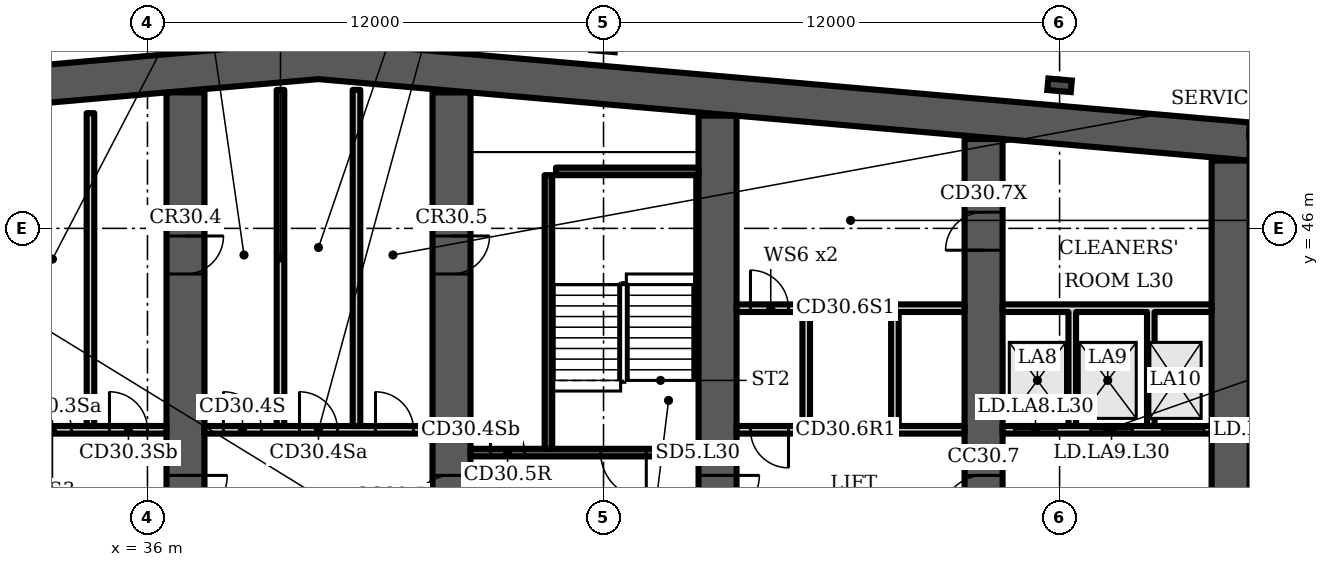
"""IFC4 building model, lengths in metres.
Left out: names, types, materials, properties, quantities, classifications, styles, units other than length and angle.
Written with IfcOpenShell. Run it as: python <this file> out.ifc"""

import sys

from ifc_helpers import new_model, si_unit, direction, frame, frame_2d, origin, origin_2d, place, context, subcontext, project, spatial, polyline, rectangle, i_section, outline, extrude, element, fill, save


model = new_model("IFC4")
c1 = context("Model", 3, precision=1e-05, world=origin(), true_north=direction((0.0, 1.0)))
c2 = subcontext(c1, "Body", "Model", "MODEL_VIEW")
j1 = project(units=[si_unit("LENGTHUNIT", "METRE"), si_unit("PLANEANGLEUNIT", "RADIAN")], contexts=[c1])
p1 = place(None, origin())
s1 = spatial("IfcSite", under=j1, at=p1, CompositionType="ELEMENT")
p2 = place(p1, origin())
s2 = spatial("IfcBuilding", under=s1, at=p2, CompositionType="ELEMENT")
p3 = place(p2, frame((0.0, 0.0, 129.1)))
s3 = spatial("IfcBuildingStorey", under=s2, at=p3, CompositionType="ELEMENT", Elevation=129.1)
p4 = place(p3, frame((0.0, 0.0, -0.0)))
e1 = element("IfcWall", 1, at=p4, inside=s3, PredefinedType="SHEAR", context=c2, shape_type="SweptSolid", body=[
    extrude(outline(polyline([(16.0, 47.784), (40.5, 49.927), (65.0, 47.784), (65.0, 48.787), (40.5, 50.931), (16.0, 48.787), (16.0, 47.784)])), origin(), (0.0, 0.0, 1.0), 3.6),
])
p5 = place(p3, frame((37.0, 35.0, 0.0), z_axis=(0.0, 0.0, 1.0), x_axis=(0.0, 1.0, 0.0)))
e2 = element("IfcWall", 2, at=p5, inside=s3, PredefinedType="SHEAR", context=c2, shape_type="SweptSolid", body=[
    extrude(rectangle(XDim=14.577, YDim=1.0, at=frame_2d((7.289, 0.0))), origin(), (0.0, 0.0, 1.0), 3.6),
])
p6 = place(p5, frame((3.4, 0.0, 0.0)))
e3 = element("IfcOpeningElement", 3, at=p6, cuts=e2, PredefinedType="OPENING", context=c2, shape_type="SweptSolid", body=[
    extrude(rectangle(XDim=1.1, YDim=2.1, at=frame_2d((0.55, 1.05))), frame((0.0, 0.51, 0.0), z_axis=(0.0, -1.0, 0.0), x_axis=(1.0, 0.0, 0.0)), (0.0, 0.0, 1.0), 1.02),
])
p7 = place(p5, frame((9.8, 0.0, 0.0)))
e4 = element("IfcOpeningElement", 4, at=p7, cuts=e2, PredefinedType="OPENING", context=c2, shape_type="SweptSolid", body=[
    extrude(rectangle(XDim=1.0, YDim=2.1, at=frame_2d((0.5, 1.05))), frame((0.0, 0.51, 0.0), z_axis=(0.0, -1.0, 0.0), x_axis=(1.0, 0.0, 0.0)), (0.0, 0.0, 1.0), 1.02),
])
p8 = place(p3, frame((44.0, 35.0, 0.0), z_axis=(0.0, 0.0, 1.0), x_axis=(0.0, 1.0, 0.0)))
e5 = element("IfcWall", 5, at=p8, inside=s3, PredefinedType="SHEAR", context=c2, shape_type="SweptSolid", body=[
    extrude(rectangle(XDim=14.577, YDim=1.0, at=frame_2d((7.289, 0.0))), origin(), (0.0, 0.0, 1.0), 3.6),
])
p9 = place(p8, frame((3.4, 0.0, 0.0)))
e6 = element("IfcOpeningElement", 6, at=p9, cuts=e5, PredefinedType="OPENING", context=c2, shape_type="SweptSolid", body=[
    extrude(rectangle(XDim=1.1, YDim=2.1, at=frame_2d((0.55, 1.05))), frame((0.0, 0.51, 0.0), z_axis=(0.0, -1.0, 0.0), x_axis=(1.0, 0.0, 0.0)), (0.0, 0.0, 1.0), 1.02),
])
p10 = place(p8, frame((9.8, 0.0, 0.0)))
e7 = element("IfcOpeningElement", 7, at=p10, cuts=e5, PredefinedType="OPENING", context=c2, shape_type="SweptSolid", body=[
    extrude(rectangle(XDim=1.0, YDim=2.1, at=frame_2d((0.5, 1.05))), frame((0.0, 0.51, 0.0), z_axis=(0.0, -1.0, 0.0), x_axis=(1.0, 0.0, 0.0)), (0.0, 0.0, 1.0), 1.02),
])
p11 = place(p3, frame((51.0, 35.0, 0.0), z_axis=(0.0, 0.0, 1.0), x_axis=(0.0, 1.0, 0.0)))
e8 = element("IfcWall", 8, at=p11, inside=s3, PredefinedType="SHEAR", context=c2, shape_type="SweptSolid", body=[
    extrude(rectangle(XDim=13.965, YDim=1.0, at=frame_2d((6.982, 0.0))), origin(), (0.0, 0.0, 1.0), 3.6),
])
p12 = place(p11, frame((3.4, 0.0, 0.0)))
e9 = element("IfcOpeningElement", 9, at=p12, cuts=e8, PredefinedType="OPENING", context=c2, shape_type="SweptSolid", body=[
    extrude(rectangle(XDim=1.1, YDim=2.1, at=frame_2d((0.55, 1.05))), frame((0.0, 0.51, 0.0), z_axis=(0.0, -1.0, 0.0), x_axis=(1.0, 0.0, 0.0)), (0.0, 0.0, 1.0), 1.02),
])
p13 = place(p3, frame((58.0, 35.0, 0.0), z_axis=(0.0, 0.0, 1.0), x_axis=(0.0, 1.0, 0.0)))
e10 = element("IfcWall", 10, at=p13, inside=s3, PredefinedType="SHEAR", context=c2, shape_type="SweptSolid", body=[
    extrude(rectangle(XDim=13.352, YDim=1.0, at=frame_2d((6.676, 0.0))), origin(), (0.0, 0.0, 1.0), 3.6),
])
p14 = place(p13, frame((10.426, 0.0, 0.0)))
e11 = element("IfcOpeningElement", 11, at=p14, cuts=e10, PredefinedType="OPENING", context=c2, shape_type="SweptSolid", body=[
    extrude(rectangle(XDim=1.0, YDim=2.1, at=frame_2d((0.5, 1.05))), frame((0.0, 0.51, 0.0), z_axis=(0.0, -1.0, 0.0), x_axis=(1.0, 0.0, 0.0)), (0.0, 0.0, 1.0), 1.02),
])
p15 = place(p13, frame((3.4, 0.0, 0.0)))
e12 = element("IfcOpeningElement", 12, at=p15, cuts=e10, PredefinedType="OPENING", context=c2, shape_type="SweptSolid", body=[
    extrude(rectangle(XDim=1.1, YDim=2.1, at=frame_2d((0.55, 1.05))), frame((0.0, 0.51, 0.0), z_axis=(0.0, -1.0, 0.0), x_axis=(1.0, 0.0, 0.0)), (0.0, 0.0, 1.0), 1.02),
])
p16 = place(p3, frame((64.5, 35.0, 0.0), z_axis=(0.0, 0.0, 1.0), x_axis=(0.0, 1.0, 0.0)))
e13 = element("IfcWall", 13, at=p16, inside=s3, PredefinedType="SHEAR", context=c2, shape_type="SweptSolid", body=[
    extrude(rectangle(XDim=12.784, YDim=1.0, at=frame_2d((6.392, 0.0))), origin(), (0.0, 0.0, 1.0), 3.6),
])
for number, where, z_axis, x_axis in (
    (14, (48.0, 50.815, 0.0), (0.0, 0.0, 1.0), (0.087, 0.996, 0.0)),
    (15, (60.0, 49.765, 0.0), (0.0, 0.0, 1.0), (0.087, 0.996, 0.0)),
):
    element("IfcColumn", number, at=place(p3, frame(where, z_axis=z_axis, x_axis=x_axis)), inside=s3, PredefinedType="COLUMN", context=c2, shape_type="SweptSolid", body=[
        extrude(i_section(OverallWidth=0.305, OverallDepth=0.62, WebThickness=0.021, FlangeThickness=0.04, FilletRadius=0.027, at=origin_2d()), origin(), (0.0, 0.0, 1.0), 3.6),
    ])
p17 = place(p3, frame((67.983, 48.326, 0.0), z_axis=(0.0, 0.0, 1.0), x_axis=(-0.996194, 0.087168, 0.0)))
e16 = element("IfcWall", 16, at=p17, inside=s3, PredefinedType="SOLIDWALL", context=c2, shape_type="SweptSolid", body=[
    extrude(rectangle(XDim=2.994, YDim=0.4, at=frame_2d((1.497, 0.0))), origin(), (0.0, 0.0, 1.0), 3.2),
])
p18 = place(p3, frame((30.5, 40.7, 0.0), z_axis=(0.0, 0.0, 1.0), x_axis=(1.0, 0.0, 0.0)))
e17 = element("IfcWall", 17, at=p18, inside=s3, PredefinedType="PARTITIONING", context=c2, shape_type="SweptSolid", body=[
    extrude(rectangle(XDim=6.0, YDim=0.2, at=frame_2d((3.0, 0.0))), origin(), (0.0, 0.0, 1.0), 3.2),
])
p19 = place(p18, frame((0.5, 0.0, 0.0)))
e18 = element("IfcOpeningElement", 18, at=p19, cuts=e17, PredefinedType="OPENING", context=c2, shape_type="SweptSolid", body=[
    extrude(rectangle(XDim=1.0, YDim=2.1, at=frame_2d((0.5, 1.05))), frame((0.0, 0.11, 0.0), z_axis=(0.0, -1.0, 0.0), x_axis=(1.0, 0.0, 0.0)), (0.0, 0.0, 1.0), 0.22),
])
p20 = place(p18, frame((2.5, 0.0, 0.0)))
e19 = element("IfcOpeningElement", 19, at=p20, cuts=e17, PredefinedType="OPENING", context=c2, shape_type="SweptSolid", body=[
    extrude(rectangle(XDim=1.0, YDim=2.1, at=frame_2d((0.5, 1.05))), frame((0.0, 0.11, 0.0), z_axis=(0.0, -1.0, 0.0), x_axis=(1.0, 0.0, 0.0)), (0.0, 0.0, 1.0), 0.22),
])
p21 = place(p18, frame((4.5, 0.0, 0.0)))
e20 = element("IfcOpeningElement", 20, at=p21, cuts=e17, PredefinedType="OPENING", context=c2, shape_type="SweptSolid", body=[
    extrude(rectangle(XDim=1.0, YDim=2.1, at=frame_2d((0.5, 1.05))), frame((0.0, 0.11, 0.0), z_axis=(0.0, -1.0, 0.0), x_axis=(1.0, 0.0, 0.0)), (0.0, 0.0, 1.0), 0.22),
])
p22 = place(p3, frame((34.5, 40.8, 0.0), z_axis=(0.0, 0.0, 1.0), x_axis=(0.0, 1.0, 0.0)))
e21 = element("IfcWall", 21, at=p22, inside=s3, PredefinedType="PARTITIONING", context=c2, shape_type="SweptSolid", body=[
    extrude(rectangle(XDim=8.232, YDim=0.2, at=frame_2d((4.116, 0.0))), origin(), (0.0, 0.0, 1.0), 3.2),
])
p23 = place(p3, frame((37.5, 40.7, 0.0), z_axis=(0.0, 0.0, 1.0), x_axis=(1.0, 0.0, 0.0)))
e22 = element("IfcWall", 22, at=p23, inside=s3, PredefinedType="PARTITIONING", context=c2, shape_type="SweptSolid", body=[
    extrude(rectangle(XDim=6.0, YDim=0.2, at=frame_2d((3.0, 0.0))), origin(), (0.0, 0.0, 1.0), 3.2),
])
p24 = place(p23, frame((0.5, 0.0, 0.0)))
e23 = element("IfcOpeningElement", 23, at=p24, cuts=e22, PredefinedType="OPENING", context=c2, shape_type="SweptSolid", body=[
    extrude(rectangle(XDim=1.0, YDim=2.1, at=frame_2d((0.5, 1.05))), frame((0.0, 0.11, 0.0), z_axis=(0.0, -1.0, 0.0), x_axis=(1.0, 0.0, 0.0)), (0.0, 0.0, 1.0), 0.22),
])
p25 = place(p23, frame((2.5, 0.0, 0.0)))
e24 = element("IfcOpeningElement", 24, at=p25, cuts=e22, PredefinedType="OPENING", context=c2, shape_type="SweptSolid", body=[
    extrude(rectangle(XDim=1.0, YDim=2.1, at=frame_2d((0.5, 1.05))), frame((0.0, 0.11, 0.0), z_axis=(0.0, -1.0, 0.0), x_axis=(1.0, 0.0, 0.0)), (0.0, 0.0, 1.0), 0.22),
])
p26 = place(p23, frame((4.5, 0.0, 0.0)))
e25 = element("IfcOpeningElement", 25, at=p26, cuts=e22, PredefinedType="OPENING", context=c2, shape_type="SweptSolid", body=[
    extrude(rectangle(XDim=1.0, YDim=2.1, at=frame_2d((0.5, 1.05))), frame((0.0, 0.11, 0.0), z_axis=(0.0, -1.0, 0.0), x_axis=(1.0, 0.0, 0.0)), (0.0, 0.0, 1.0), 0.22),
])
for number, where, z_axis, x_axis in (
    (26, (39.5, 40.8, 0.0), (0.0, 0.0, 1.0), (0.0, 1.0, 0.0)),
    (27, (41.5, 40.8, 0.0), (0.0, 0.0, 1.0), (0.0, 1.0, 0.0)),
):
    element("IfcWall", number, at=place(p3, frame(where, z_axis=z_axis, x_axis=x_axis)), inside=s3, PredefinedType="PARTITIONING", context=c2, shape_type="SweptSolid", body=[
        extrude(rectangle(XDim=8.844, YDim=0.2, at=frame_2d((4.422, 0.0))), origin(), (0.0, 0.0, 1.0), 3.2),
    ])
p27 = place(p3, frame((44.5, 40.1, 0.0), z_axis=(0.0, 0.0, 1.0), x_axis=(1.0, 0.0, 0.0)))
e28 = element("IfcWall", 28, at=p27, inside=s3, PredefinedType="SHEAR", context=c2, shape_type="SweptSolid", body=[
    extrude(rectangle(XDim=6.0, YDim=0.2, at=frame_2d((3.0, 0.0))), origin(), (0.0, 0.0, 1.0), 3.2),
])
p28 = place(p27, frame((3.425, 0.0, 0.0)))
e29 = element("IfcOpeningElement", 29, at=p28, cuts=e28, PredefinedType="OPENING", context=c2, shape_type="SweptSolid", body=[
    extrude(rectangle(XDim=1.2, YDim=2.1, at=frame_2d((0.6, 1.05))), frame((0.0, 0.11, 0.0), z_axis=(0.0, -1.0, 0.0), x_axis=(1.0, 0.0, 0.0)), (0.0, 0.0, 1.0), 0.22),
])
p29 = place(p27, frame((0.525, 0.0, 0.0)))
e30 = element("IfcOpeningElement", 30, at=p29, cuts=e28, PredefinedType="OPENING", context=c2, shape_type="SweptSolid", body=[
    extrude(rectangle(XDim=0.9, YDim=2.1, at=frame_2d((0.45, 1.05))), frame((0.0, 0.11, 0.0), z_axis=(0.0, -1.0, 0.0), x_axis=(1.0, 0.0, 0.0)), (0.0, 0.0, 1.0), 0.22),
])
p30 = place(p3, frame((46.55, 40.2, 0.0), z_axis=(0.0, 0.0, 1.0), x_axis=(0.0, 1.0, 0.0)))
e31 = element("IfcWall", 31, at=p30, inside=s3, PredefinedType="SHEAR", context=c2, shape_type="SweptSolid", body=[
    extrude(rectangle(XDim=7.2, YDim=0.2, at=frame_2d((3.6, 0.0))), origin(), (0.0, 0.0, 1.0), 3.2),
])
p31 = place(p3, frame((46.75, 47.5, 0.0), z_axis=(0.0, 0.0, 1.0), x_axis=(1.0, 0.0, 0.0)))
e32 = element("IfcWall", 32, at=p31, inside=s3, PredefinedType="SHEAR", context=c2, shape_type="SweptSolid", body=[
    extrude(rectangle(XDim=3.75, YDim=0.2, at=frame_2d((1.875, 0.0))), origin(), (0.0, 0.0, 1.0), 3.2),
])
p32 = place(p3, frame((51.5, 40.7, 0.0), z_axis=(0.0, 0.0, 1.0), x_axis=(1.0, 0.0, 0.0)))
e33 = element("IfcWall", 33, at=p32, inside=s3, PredefinedType="PARTITIONING", context=c2, shape_type="SweptSolid", body=[
    extrude(rectangle(XDim=6.0, YDim=0.2, at=frame_2d((3.0, 0.0))), origin(), (0.0, 0.0, 1.0), 3.2),
])
p33 = place(p32, frame((0.367, 0.0, 0.0)))
e34 = element("IfcOpeningElement", 34, at=p33, cuts=e33, PredefinedType="OPENING", context=c2, shape_type="SweptSolid", body=[
    extrude(rectangle(XDim=1.0, YDim=2.1, at=frame_2d((0.5, 1.05))), frame((0.0, 0.11, 0.0), z_axis=(0.0, -1.0, 0.0), x_axis=(1.0, 0.0, 0.0)), (0.0, 0.0, 1.0), 0.22),
])
p34 = place(p3, frame((51.5, 43.9, 0.0), z_axis=(0.0, 0.0, 1.0), x_axis=(1.0, 0.0, 0.0)))
e35 = element("IfcWall", 35, at=p34, inside=s3, PredefinedType="PARTITIONING", context=c2, shape_type="SweptSolid", body=[
    extrude(rectangle(XDim=6.0, YDim=0.2, at=frame_2d((3.0, 0.0))), origin(), (0.0, 0.0, 1.0), 3.2),
])
p35 = place(p34, frame((0.367, 0.0, 0.0)))
e36 = element("IfcOpeningElement", 36, at=p35, cuts=e35, PredefinedType="OPENING", context=c2, shape_type="SweptSolid", body=[
    extrude(rectangle(XDim=1.0, YDim=2.1, at=frame_2d((0.5, 1.05))), frame((0.0, 0.11, 0.0), z_axis=(0.0, -1.0, 0.0), x_axis=(1.0, 0.0, 0.0)), (0.0, 0.0, 1.0), 0.22),
])
p36 = place(p3, frame((0.0, 0.0, -0.0)))
e37 = element("IfcWall", 37, at=p36, inside=s3, PredefinedType="PARTITIONING", context=c2, shape_type="SweptSolid", body=[
    extrude(outline(polyline([(53.233, 40.8), (53.233, 43.8), (53.433, 43.8), (53.433, 40.8), (53.233, 40.8)])), origin(), (0.0, 0.0, 1.0), 3.2),
])
p37 = place(p3, frame((0.0, 0.0, -0.0)))
e38 = element("IfcWall", 38, at=p37, inside=s3, PredefinedType="PARTITIONING", context=c2, shape_type="SweptSolid", body=[
    extrude(outline(polyline([(55.567, 40.8), (55.567, 43.8), (55.767, 43.8), (55.767, 40.8), (55.567, 40.8)])), origin(), (0.0, 0.0, 1.0), 3.2),
])
p38 = place(p3, frame((58.5, 40.7, 0.0), z_axis=(0.0, 0.0, 1.0), x_axis=(1.0, 0.0, 0.0)))
e39 = element("IfcWall", 39, at=p38, inside=s3, PredefinedType="PARTITIONING", context=c2, shape_type="SweptSolid", body=[
    extrude(rectangle(XDim=5.5, YDim=0.2, at=frame_2d((2.75, 0.0))), origin(), (0.0, 0.0, 1.0), 3.2),
])
p39 = place(p38, frame((0.317, 0.0, 0.0)))
e40 = element("IfcOpeningElement", 40, at=p39, cuts=e39, PredefinedType="OPENING", context=c2, shape_type="SweptSolid", body=[
    extrude(rectangle(XDim=1.1, YDim=2.1, at=frame_2d((0.55, 1.05))), frame((0.0, 0.11, 0.0), z_axis=(0.0, -1.0, 0.0), x_axis=(1.0, 0.0, 0.0)), (0.0, 0.0, 1.0), 0.22),
])
p40 = place(p38, frame((2.317, 0.0, 0.0)))
e41 = element("IfcOpeningElement", 41, at=p40, cuts=e39, PredefinedType="OPENING", context=c2, shape_type="SweptSolid", body=[
    extrude(rectangle(XDim=1.1, YDim=2.1, at=frame_2d((0.55, 1.05))), frame((0.0, 0.11, 0.0), z_axis=(0.0, -1.0, 0.0), x_axis=(1.0, 0.0, 0.0)), (0.0, 0.0, 1.0), 0.22),
])
p41 = place(p38, frame((4.2, 0.0, 0.0)))
e42 = element("IfcOpeningElement", 42, at=p41, cuts=e39, PredefinedType="OPENING", context=c2, shape_type="SweptSolid", body=[
    extrude(rectangle(XDim=1.1, YDim=2.1, at=frame_2d((0.55, 1.05))), frame((0.0, 0.11, 0.0), z_axis=(0.0, -1.0, 0.0), x_axis=(1.0, 0.0, 0.0)), (0.0, 0.0, 1.0), 0.22),
])
p42 = place(p3, frame((0.0, 0.0, -0.0)))
e43 = element("IfcWall", 43, at=p42, inside=s3, PredefinedType="PARTITIONING", context=c2, shape_type="SweptSolid", body=[
    extrude(outline(polyline([(60.433, 40.8), (60.233, 40.8), (60.233, 43.8), (58.5, 43.8), (58.5, 44.0), (64.0, 44.0), (64.0, 43.8), (62.5, 43.8), (62.5, 40.8), (62.3, 40.8), (62.3, 43.8), (60.433, 43.8), (60.433, 40.8)])), origin(), (0.0, 0.0, 1.0), 3.2),
])
p43 = place(p20, origin())
e44 = element("IfcDoor", 44, at=p43, inside=s3, OperationType="SINGLE_SWING_LEFT", PredefinedType="DOOR", context=c2, shape_type="SweptSolid", body=[
    extrude(rectangle(XDim=1.0, YDim=2.1, at=frame_2d((0.5, 1.05))), frame((0.0, 0.025, 0.0), z_axis=(0.0, -1.0, 0.0), x_axis=(1.0, 0.0, 0.0)), (0.0, 0.0, 1.0), 0.05),
])
fill(e19, e44)
p44 = place(p21, origin())
e45 = element("IfcDoor", 45, at=p44, inside=s3, OperationType="SINGLE_SWING_LEFT", PredefinedType="DOOR", context=c2, shape_type="SweptSolid", body=[
    extrude(rectangle(XDim=1.0, YDim=2.1, at=frame_2d((0.5, 1.05))), frame((0.0, 0.025, 0.0), z_axis=(0.0, -1.0, 0.0), x_axis=(1.0, 0.0, 0.0)), (0.0, 0.0, 1.0), 0.05),
])
fill(e20, e45)
p45 = place(p24, origin())
e46 = element("IfcDoor", 46, at=p45, inside=s3, OperationType="SINGLE_SWING_LEFT", PredefinedType="DOOR", context=c2, shape_type="SweptSolid", body=[
    extrude(rectangle(XDim=1.0, YDim=2.1, at=frame_2d((0.5, 1.05))), frame((0.0, 0.025, 0.0), z_axis=(0.0, -1.0, 0.0), x_axis=(1.0, 0.0, 0.0)), (0.0, 0.0, 1.0), 0.05),
])
fill(e23, e46)
p46 = place(p25, origin())
e47 = element("IfcDoor", 47, at=p46, inside=s3, OperationType="SINGLE_SWING_LEFT", PredefinedType="DOOR", context=c2, shape_type="SweptSolid", body=[
    extrude(rectangle(XDim=1.0, YDim=2.1, at=frame_2d((0.5, 1.05))), frame((0.0, 0.025, 0.0), z_axis=(0.0, -1.0, 0.0), x_axis=(1.0, 0.0, 0.0)), (0.0, 0.0, 1.0), 0.05),
])
fill(e24, e47)
p47 = place(p26, origin())
e48 = element("IfcDoor", 48, at=p47, inside=s3, OperationType="SINGLE_SWING_LEFT", PredefinedType="DOOR", context=c2, shape_type="SweptSolid", body=[
    extrude(rectangle(XDim=1.0, YDim=2.1, at=frame_2d((0.5, 1.05))), frame((0.0, 0.025, 0.0), z_axis=(0.0, -1.0, 0.0), x_axis=(1.0, 0.0, 0.0)), (0.0, 0.0, 1.0), 0.05),
])
fill(e25, e48)
p48 = place(p28, origin())
e49 = element("IfcDoor", 49, at=p48, inside=s3, OperationType="SINGLE_SWING_RIGHT", PredefinedType="DOOR", context=c2, shape_type="SweptSolid", body=[
    extrude(rectangle(XDim=1.2, YDim=2.1, at=frame_2d((0.6, 1.05))), frame((0.0, 0.025, 0.0), z_axis=(0.0, -1.0, 0.0), x_axis=(1.0, 0.0, 0.0)), (0.0, 0.0, 1.0), 0.05),
])
fill(e29, e49)
p49 = place(p29, origin())
e50 = element("IfcDoor", 50, at=p49, inside=s3, OperationType="SINGLE_SWING_LEFT", PredefinedType="DOOR", context=c2, shape_type="SweptSolid", body=[
    extrude(rectangle(XDim=0.9, YDim=2.1, at=frame_2d((0.45, 1.05))), frame((0.0, 0.025, 0.0), z_axis=(0.0, -1.0, 0.0), x_axis=(1.0, 0.0, 0.0)), (0.0, 0.0, 1.0), 0.05),
])
fill(e30, e50)
p50 = place(p33, origin())
e51 = element("IfcDoor", 51, at=p50, inside=s3, OperationType="SINGLE_SWING_RIGHT", PredefinedType="DOOR", context=c2, shape_type="SweptSolid", body=[
    extrude(rectangle(XDim=1.0, YDim=2.1, at=frame_2d((0.5, 1.05))), frame((0.0, 0.025, 0.0), z_axis=(0.0, -1.0, 0.0), x_axis=(1.0, 0.0, 0.0)), (0.0, 0.0, 1.0), 0.05),
])
fill(e34, e51)
p51 = place(p35, origin())
e52 = element("IfcDoor", 52, at=p51, inside=s3, OperationType="SINGLE_SWING_LEFT", PredefinedType="DOOR", context=c2, shape_type="SweptSolid", body=[
    extrude(rectangle(XDim=1.0, YDim=2.1, at=frame_2d((0.5, 1.05))), frame((0.0, 0.025, 0.0), z_axis=(0.0, -1.0, 0.0), x_axis=(1.0, 0.0, 0.0)), (0.0, 0.0, 1.0), 0.05),
])
fill(e36, e52)
p52 = place(p39, origin())
e53 = element("IfcDoor", 53, at=p52, inside=s3, OperationType="DOUBLE_DOOR_SLIDING", PredefinedType="DOOR", context=c2, shape_type="SweptSolid", body=[
    extrude(rectangle(XDim=1.1, YDim=2.1, at=frame_2d((0.55, 1.05))), frame((0.0, 0.025, 0.0), z_axis=(0.0, -1.0, 0.0), x_axis=(1.0, 0.0, 0.0)), (0.0, 0.0, 1.0), 0.05),
])
fill(e40, e53)
p53 = place(p40, origin())
e54 = element("IfcDoor", 54, at=p53, inside=s3, OperationType="DOUBLE_DOOR_SLIDING", PredefinedType="DOOR", context=c2, shape_type="SweptSolid", body=[
    extrude(rectangle(XDim=1.1, YDim=2.1, at=frame_2d((0.55, 1.05))), frame((0.0, 0.025, 0.0), z_axis=(0.0, -1.0, 0.0), x_axis=(1.0, 0.0, 0.0)), (0.0, 0.0, 1.0), 0.05),
])
fill(e41, e54)
p54 = place(p41, origin())
e55 = element("IfcDoor", 55, at=p54, inside=s3, OperationType="DOUBLE_DOOR_SLIDING", PredefinedType="DOOR", context=c2, shape_type="SweptSolid", body=[
    extrude(rectangle(XDim=1.1, YDim=2.1, at=frame_2d((0.55, 1.05))), frame((0.0, 0.025, 0.0), z_axis=(0.0, -1.0, 0.0), x_axis=(1.0, 0.0, 0.0)), (0.0, 0.0, 1.0), 0.05),
])
fill(e42, e55)
p55 = place(p14, origin())
e56 = element("IfcDoor", 56, at=p55, inside=s3, OperationType="SINGLE_SWING_LEFT", PredefinedType="DOOR", context=c2, shape_type="SweptSolid", body=[
    extrude(rectangle(XDim=1.0, YDim=2.1, at=frame_2d((0.5, 1.05))), frame((0.0, 0.5, 0.0), z_axis=(0.0, -1.0, 0.0), x_axis=(1.0, 0.0, 0.0)), (0.0, 0.0, 1.0), 1.0),
])
fill(e11, e56)
p56 = place(p6, origin())
e57 = element("IfcDoor", 57, at=p56, inside=s3, OperationType="SINGLE_SWING_RIGHT", PredefinedType="DOOR", context=c2, shape_type="SweptSolid", body=[
    extrude(rectangle(XDim=1.1, YDim=2.1, at=frame_2d((0.55, 1.05))), frame((0.0, 0.025, 0.0), z_axis=(0.0, -1.0, 0.0), x_axis=(1.0, 0.0, 0.0)), (0.0, 0.0, 1.0), 0.05),
])
fill(e3, e57)
p57 = place(p7, origin())
e58 = element("IfcDoor", 58, at=p57, inside=s3, OperationType="SINGLE_SWING_RIGHT", PredefinedType="DOOR", context=c2, shape_type="SweptSolid", body=[
    extrude(rectangle(XDim=1.0, YDim=2.1, at=frame_2d((0.5, 1.05))), frame((0.0, 0.5, 0.0), z_axis=(0.0, -1.0, 0.0), x_axis=(1.0, 0.0, 0.0)), (0.0, 0.0, 1.0), 1.0),
])
fill(e4, e58)
p58 = place(p9, origin())
e59 = element("IfcDoor", 59, at=p58, inside=s3, OperationType="SINGLE_SWING_LEFT", PredefinedType="DOOR", context=c2, shape_type="SweptSolid", body=[
    extrude(rectangle(XDim=1.1, YDim=2.1, at=frame_2d((0.55, 1.05))), frame((0.0, 0.025, 0.0), z_axis=(0.0, -1.0, 0.0), x_axis=(1.0, 0.0, 0.0)), (0.0, 0.0, 1.0), 0.05),
])
fill(e6, e59)
p59 = place(p10, origin())
e60 = element("IfcDoor", 60, at=p59, inside=s3, OperationType="SINGLE_SWING_RIGHT", PredefinedType="DOOR", context=c2, shape_type="SweptSolid", body=[
    extrude(rectangle(XDim=1.0, YDim=2.1, at=frame_2d((0.5, 1.05))), frame((0.0, 0.5, 0.0), z_axis=(0.0, -1.0, 0.0), x_axis=(1.0, 0.0, 0.0)), (0.0, 0.0, 1.0), 1.0),
])
fill(e7, e60)
p60 = place(p12, origin())
e61 = element("IfcDoor", 61, at=p60, inside=s3, OperationType="SINGLE_SWING_RIGHT", PredefinedType="DOOR", context=c2, shape_type="SweptSolid", body=[
    extrude(rectangle(XDim=1.1, YDim=2.1, at=frame_2d((0.55, 1.05))), frame((0.0, 0.025, 0.0), z_axis=(0.0, -1.0, 0.0), x_axis=(1.0, 0.0, 0.0)), (0.0, 0.0, 1.0), 0.05),
])
fill(e9, e61)
p61 = place(p15, origin())
e62 = element("IfcDoor", 62, at=p61, inside=s3, OperationType="SINGLE_SWING_LEFT", PredefinedType="DOOR", context=c2, shape_type="SweptSolid", body=[
    extrude(rectangle(XDim=1.1, YDim=2.1, at=frame_2d((0.55, 1.05))), frame((0.0, 0.025, 0.0), z_axis=(0.0, -1.0, 0.0), x_axis=(1.0, 0.0, 0.0)), (0.0, 0.0, 1.0), 0.05),
])
fill(e12, e62)
save(model, sys.argv[1])
